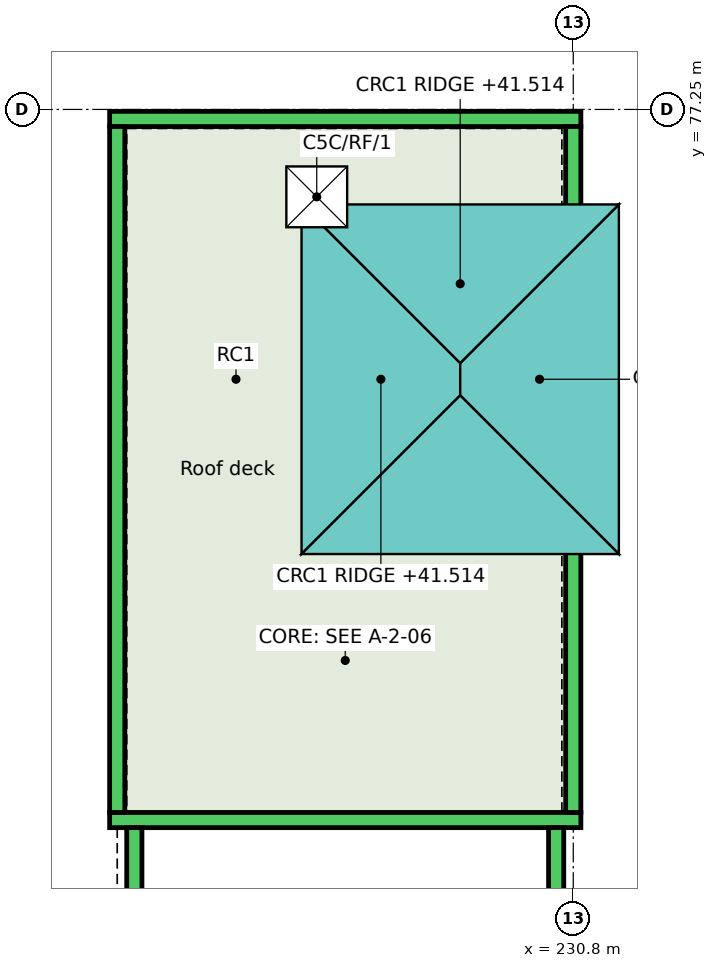
"""IFC4 building model, lengths in metres.
Left out: names, types, materials, properties, quantities, classifications, styles, units other than length and angle.
Written with IfcOpenShell. Run it as: python <this file> out.ifc"""

import sys

from ifc_helpers import new_model, si_unit, direction, frame, frame_2d, origin, origin_2d, place, context, subcontext, project, spatial, rectangle, extrude, element, save


model = new_model("IFC4")
c1 = context("Model", 3, precision=1e-05, world=origin(), true_north=direction((0.0, 1.0)))
c2 = subcontext(c1, "Body", "Model", "MODEL_VIEW")
j1 = project(units=[si_unit("LENGTHUNIT", "METRE"), si_unit("PLANEANGLEUNIT", "RADIAN")], contexts=[c1])
p1 = place(None, origin())
s1 = spatial("IfcSite", under=j1, at=p1, CompositionType="ELEMENT")
p2 = place(p1, origin())
s2 = spatial("IfcBuilding", under=s1, at=p2, CompositionType="ELEMENT")
p3 = place(p2, frame((0.0, 0.0, 39.0)))
s3 = spatial("IfcBuildingStorey", under=s2, at=p3, CompositionType="ELEMENT", Elevation=39.0)
for number, where, z_axis, x_axis in (
    (1, (227.825, 72.1, 0.0), (0.0, 0.0, 1.0), (1.0, 0.0, 0.0)),
    (2, (227.825, 75.3, 0.0), (0.0, 0.0, 1.0), (1.0, 0.0, 0.0)),
):
    element("IfcWall", number, at=place(p3, frame(where, z_axis=z_axis, x_axis=x_axis)), inside=s3, PredefinedType="SHEAR", context=c2, shape_type="SweptSolid", body=[
        extrude(rectangle(XDim=2.975, YDim=0.2, at=frame_2d((1.488, 0.0))), origin(), (0.0, 0.0, 1.0), 1.5),
    ])
p4 = place(p3, frame((227.925, 72.2, 0.0), z_axis=(0.0, 0.0, 1.0), x_axis=(0.0, 1.0, 0.0)))
e3 = element("IfcWall", 3, at=p4, inside=s3, PredefinedType="SHEAR", context=c2, shape_type="SweptSolid", body=[
    extrude(rectangle(XDim=3.0, YDim=0.2, at=frame_2d((1.5, 0.0))), origin(), (0.0, 0.0, 1.0), 1.5),
])
p5 = place(p3, frame((230.725, 72.2, 0.0), z_axis=(0.0, 0.0, 1.0), x_axis=(0.0, 1.0, 0.0)))
e4 = element("IfcWall", 4, at=p5, inside=s3, PredefinedType="SHEAR", context=c2, shape_type="SweptSolid", body=[
    extrude(rectangle(XDim=3.0, YDim=0.15, at=frame_2d((1.5, 0.0))), origin(), (0.0, 0.0, 1.0), 1.5),
])
for number, where, z_axis, x_axis in (
    (5, (224.7, 77.125, 0.0), (0.0, 0.0, 1.0), (1.0, 0.0, 0.0)),
    (6, (224.7, 67.9, 0.0), (0.0, 0.0, 1.0), (1.0, 0.0, 0.0)),
):
    element("IfcWall", number, at=place(p3, frame(where, z_axis=z_axis, x_axis=x_axis)), inside=s3, PredefinedType="PARAPET", context=c2, shape_type="SweptSolid", body=[
        extrude(rectangle(XDim=6.2, YDim=0.2, at=frame_2d((3.1, 0.0))), origin(), (0.0, 0.0, 1.0), 1.1),
    ])
p6 = place(p3, frame((224.8, 68.0, 0.0), z_axis=(0.0, 0.0, 1.0), x_axis=(0.0, 1.0, 0.0)))
e7 = element("IfcWall", 7, at=p6, inside=s3, PredefinedType="PARAPET", context=c2, shape_type="SweptSolid", body=[
    extrude(rectangle(XDim=9.025, YDim=0.2, at=frame_2d((4.512, 0.0))), origin(), (0.0, 0.0, 1.0), 1.1),
])
p7 = place(p3, frame((230.8, 68.0, 0.0), z_axis=(0.0, 0.0, 1.0), x_axis=(0.0, 1.0, 0.0)))
e8 = element("IfcWall", 8, at=p7, inside=s3, PredefinedType="PARAPET", context=c2, shape_type="SweptSolid", body=[
    extrude(rectangle(XDim=4.0, YDim=0.2, at=frame_2d((2.0, 0.0))), origin(), (0.0, 0.0, 1.0), 1.1),
])
p8 = place(p3, frame((230.8, 75.4, 0.0), z_axis=(0.0, 0.0, 1.0), x_axis=(0.0, 1.0, 0.0)))
e9 = element("IfcWall", 9, at=p8, inside=s3, PredefinedType="PARAPET", context=c2, shape_type="SweptSolid", body=[
    extrude(rectangle(XDim=1.625, YDim=0.2, at=frame_2d((0.812, 0.0))), origin(), (0.0, 0.0, 1.0), 1.1),
])
for number, where, z_axis, x_axis in (
    (10, (225.025, 66.225, 0.0), (0.0, 0.0, 1.0), (0.0, 1.0, 0.0)),
    (11, (230.575, 66.225, 0.0), (0.0, 0.0, 1.0), (0.0, 1.0, 0.0)),
):
    element("IfcWall", number, at=place(p3, frame(where, z_axis=z_axis, x_axis=x_axis)), inside=s3, PredefinedType="PARAPET", context=c2, shape_type="SweptSolid", body=[
        extrude(rectangle(XDim=1.575, YDim=0.2, at=frame_2d((0.788, 0.0))), origin(), (0.0, 0.0, 1.0), 1.1),
    ])
p9 = place(p3, frame((0.0, 0.0, -0.25)))
p10 = place(p9, frame((227.425, 76.1, 0.0)))
p11 = place(p10, frame((0.0, 0.0, 0.2)))
e12 = element("IfcDoor", 12, at=p11, inside=s3, OperationType="SINGLE_SWING_LEFT", PredefinedType="TRAPDOOR", context=c2, shape_type="SweptSolid", body=[
    extrude(rectangle(XDim=0.8, YDim=0.8, at=origin_2d()), origin(), (0.0, 0.0, 1.0), 0.05),
])
save(model, sys.argv[1])
